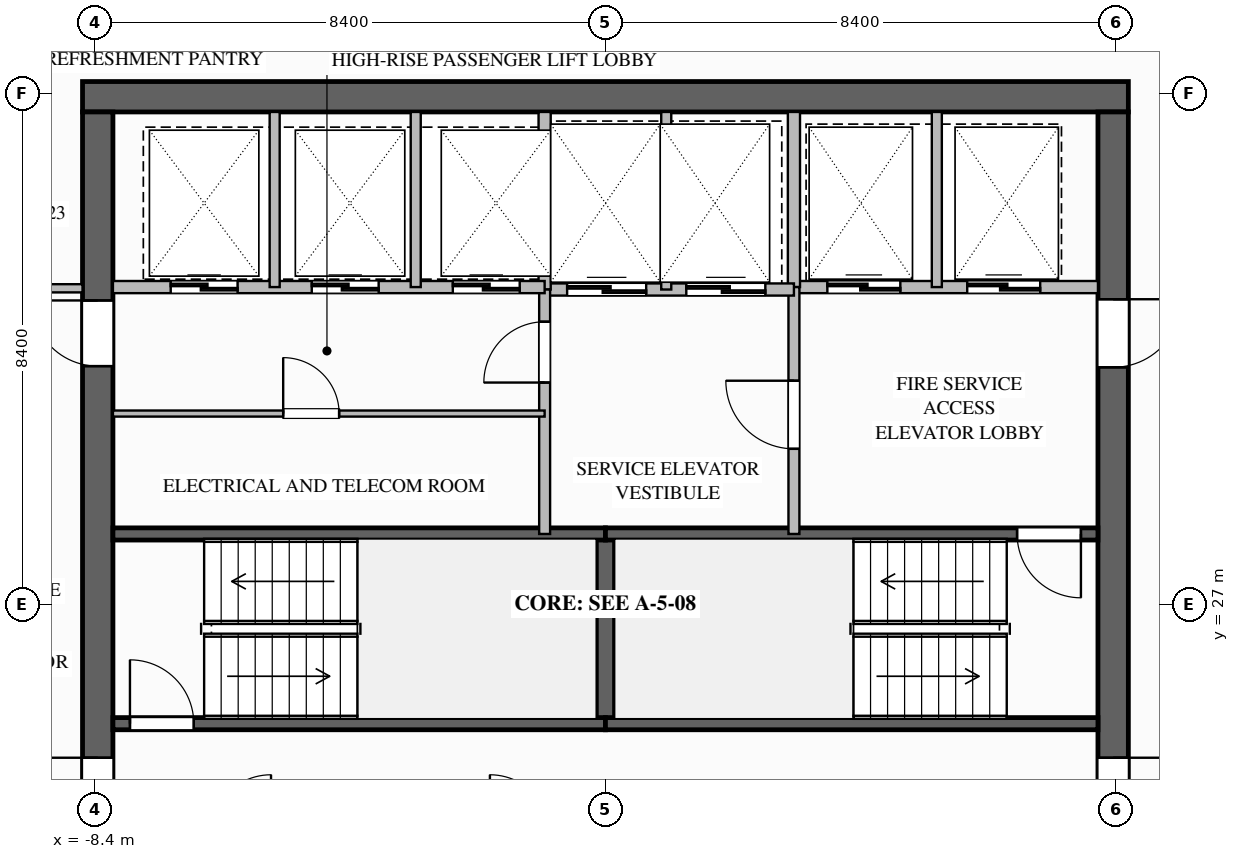
"""IFC4 building model, lengths in metres.
Left out: names, types, materials, properties, quantities, classifications, styles, units other than length and angle.
Written with IfcOpenShell. Run it as: python <this file> out.ifc"""

import sys

from ifc_helpers import new_model, si_unit, direction, frame, frame_2d, origin, place, context, subcontext, project, spatial, rectangle, extrude, element, fill, save


model = new_model("IFC4")
c1 = context("Model", 3, precision=1e-05, world=origin(), true_north=direction((0.0, 1.0)))
c2 = subcontext(c1, "Body", "Model", "MODEL_VIEW")
j1 = project(units=[si_unit("LENGTHUNIT", "METRE"), si_unit("PLANEANGLEUNIT", "RADIAN")], contexts=[c1])
p1 = place(None, origin())
s1 = spatial("IfcSite", under=j1, at=p1, CompositionType="ELEMENT")
p2 = place(p1, origin())
s2 = spatial("IfcBuilding", under=s1, at=p2, CompositionType="ELEMENT")
p3 = place(p2, frame((0.0, 0.0, 178.8)))
s3 = spatial("IfcBuildingStorey", under=s2, at=p3, CompositionType="ELEMENT", Elevation=178.8)
p4 = place(p3, frame((-8.6, 35.35, 0.0), z_axis=(0.0, 0.0, 1.0), x_axis=(1.0, 0.0, 0.0)))
e1 = element("IfcWall", 1, at=p4, inside=s3, PredefinedType="SHEAR", context=c2, shape_type="SweptSolid", body=[
    extrude(rectangle(XDim=17.2, YDim=0.5, at=frame_2d((8.6, 0.0))), origin(), (0.0, 0.0, 1.0), 3.55),
])
p5 = place(p3, frame((8.35, 35.1, 0.0), z_axis=(0.0, 0.0, 1.0), x_axis=(0.0, -1.0, 0.0)))
e2 = element("IfcWall", 2, at=p5, inside=s3, PredefinedType="SHEAR", context=c2, shape_type="SweptSolid", body=[
    extrude(rectangle(XDim=16.2, YDim=0.5, at=frame_2d((8.1, 0.0))), origin(), (0.0, 0.0, 1.0), 3.55),
])
p6 = place(p5, frame((3.08, 0.0, 0.0)))
e3 = element("IfcOpeningElement", 3, at=p6, cuts=e2, PredefinedType="OPENING", context=c2, shape_type="SweptSolid", body=[
    extrude(rectangle(XDim=1.12, YDim=2.1, at=frame_2d((0.56, 1.05))), frame((0.0, 0.26, 0.0), z_axis=(0.0, -1.0, 0.0), x_axis=(1.0, 0.0, 0.0)), (0.0, 0.0, 1.0), 0.52),
])
p7 = place(p5, frame((10.62, 0.0, 0.0)))
e4 = element("IfcOpeningElement", 4, at=p7, cuts=e2, PredefinedType="OPENING", context=c2, shape_type="SweptSolid", body=[
    extrude(rectangle(XDim=1.08, YDim=2.04, at=frame_2d((0.54, 1.02))), frame((0.0, 0.26, 0.0), z_axis=(0.0, -1.0, 0.0), x_axis=(1.0, 0.0, 0.0)), (0.0, 0.0, 1.0), 0.52),
])
p8 = place(p3, frame((-8.35, 18.9, 0.0), z_axis=(0.0, 0.0, 1.0), x_axis=(0.0, 1.0, 0.0)))
e5 = element("IfcWall", 5, at=p8, inside=s3, PredefinedType="SHEAR", context=c2, shape_type="SweptSolid", body=[
    extrude(rectangle(XDim=16.2, YDim=0.5, at=frame_2d((8.1, 0.0))), origin(), (0.0, 0.0, 1.0), 3.55),
])
p9 = place(p8, frame((12.02, 0.0, 0.0)))
e6 = element("IfcOpeningElement", 6, at=p9, cuts=e5, PredefinedType="OPENING", context=c2, shape_type="SweptSolid", body=[
    extrude(rectangle(XDim=1.08, YDim=2.04, at=frame_2d((0.54, 1.02))), frame((0.0, 0.26, 0.0), z_axis=(0.0, -1.0, 0.0), x_axis=(1.0, 0.0, 0.0)), (0.0, 0.0, 1.0), 0.52),
])
p10 = place(p8, frame((4.5, 0.0, 0.0)))
e7 = element("IfcOpeningElement", 7, at=p10, cuts=e5, PredefinedType="OPENING", context=c2, shape_type="SweptSolid", body=[
    extrude(rectangle(XDim=1.08, YDim=2.04, at=frame_2d((0.54, 1.02))), frame((0.0, 0.26, 0.0), z_axis=(0.0, -1.0, 0.0), x_axis=(1.0, 0.0, 0.0)), (0.0, 0.0, 1.0), 0.52),
])
p11 = place(p3, frame((0.0, 25.04, 0.0), z_axis=(0.0, 0.0, 1.0), x_axis=(0.0, 1.0, 0.0)))
e8 = element("IfcWall", 8, at=p11, inside=s3, PredefinedType="SOLIDWALL", context=c2, shape_type="SweptSolid", body=[
    extrude(rectangle(XDim=3.12, YDim=0.3, at=frame_2d((1.56, 0.0))), origin(), (0.0, 0.0, 1.0), 3.29),
])
p12 = place(p3, frame((-8.1, 25.04, 0.0), z_axis=(0.0, 0.0, 1.0), x_axis=(1.0, 0.0, 0.0)))
e9 = element("IfcWall", 9, at=p12, inside=s3, PredefinedType="SOLIDWALL", context=c2, shape_type="SweptSolid", body=[
    extrude(rectangle(XDim=8.1, YDim=0.2, at=frame_2d((4.05, 0.0))), origin(), (0.0, 0.0, 1.0), 3.29),
])
p13 = place(p12, frame((0.28, 0.0, 0.0)))
e10 = element("IfcOpeningElement", 10, at=p13, cuts=e9, PredefinedType="OPENING", context=c2, shape_type="SweptSolid", body=[
    extrude(rectangle(XDim=1.05, YDim=2.1, at=frame_2d((0.525, 1.05))), frame((0.0, 0.11, 0.0), z_axis=(0.0, -1.0, 0.0), x_axis=(1.0, 0.0, 0.0)), (0.0, 0.0, 1.0), 0.22),
])
for number, where, z_axis, x_axis in (
    (11, (-8.1, 28.16, 0.0), (0.0, 0.0, 1.0), (1.0, 0.0, 0.0)),
    (12, (0.0, 25.04, 0.0), (0.0, 0.0, 1.0), (1.0, 0.0, 0.0)),
):
    element("IfcWall", number, at=place(p3, frame(where, z_axis=z_axis, x_axis=x_axis)), inside=s3, PredefinedType="SOLIDWALL", context=c2, shape_type="SweptSolid", body=[
        extrude(rectangle(XDim=8.1, YDim=0.2, at=frame_2d((4.05, 0.0))), origin(), (0.0, 0.0, 1.0), 3.29),
    ])
p14 = place(p3, frame((8.1, 28.16, 0.0), z_axis=(0.0, 0.0, 1.0), x_axis=(-1.0, 0.0, 0.0)))
e13 = element("IfcWall", 13, at=p14, inside=s3, PredefinedType="SOLIDWALL", context=c2, shape_type="SweptSolid", body=[
    extrude(rectangle(XDim=8.1, YDim=0.2, at=frame_2d((4.05, 0.0))), origin(), (0.0, 0.0, 1.0), 3.29),
])
p15 = place(p14, frame((0.28, 0.0, 0.0)))
e14 = element("IfcOpeningElement", 14, at=p15, cuts=e13, PredefinedType="OPENING", context=c2, shape_type="SweptSolid", body=[
    extrude(rectangle(XDim=1.05, YDim=2.1, at=frame_2d((0.525, 1.05))), frame((0.0, 0.11, 0.0), z_axis=(0.0, -1.0, 0.0), x_axis=(1.0, 0.0, 0.0)), (0.0, 0.0, 1.0), 0.22),
])
p16 = place(p3, frame((3.1, 32.22, 0.0), z_axis=(0.0, 0.0, 1.0), x_axis=(1.0, 0.0, 0.0)))
e15 = element("IfcWall", 15, at=p16, inside=s3, PredefinedType="SOLIDWALL", context=c2, shape_type="SweptSolid", body=[
    extrude(rectangle(XDim=5.0, YDim=0.2, at=frame_2d((2.5, 0.0))), origin(), (0.0, 0.0, 1.0), 3.29),
])
p17 = place(p16, frame((0.55, 0.0, 0.0)))
e16 = element("IfcOpeningElement", 16, at=p17, cuts=e15, PredefinedType="OPENING", context=c2, shape_type="SweptSolid", body=[
    extrude(rectangle(XDim=1.2, YDim=2.2, at=frame_2d((0.6, 1.1))), frame((0.0, 0.11, 0.0), z_axis=(0.0, -1.0, 0.0), x_axis=(1.0, 0.0, 0.0)), (0.0, 0.0, 1.0), 0.22),
])
p18 = place(p16, frame((2.85, 0.0, 0.0)))
e17 = element("IfcOpeningElement", 17, at=p18, cuts=e15, PredefinedType="OPENING", context=c2, shape_type="SweptSolid", body=[
    extrude(rectangle(XDim=1.2, YDim=2.2, at=frame_2d((0.6, 1.1))), frame((0.0, 0.11, 0.0), z_axis=(0.0, -1.0, 0.0), x_axis=(1.0, 0.0, 0.0)), (0.0, 0.0, 1.0), 0.22),
])
p19 = place(p3, frame((3.1, 32.22, 0.0), z_axis=(0.0, 0.0, 1.0), x_axis=(0.0, 1.0, 0.0)))
e18 = element("IfcWall", 18, at=p19, inside=s3, PredefinedType="SOLIDWALL", context=c2, shape_type="SweptSolid", body=[
    extrude(rectangle(XDim=2.88, YDim=0.2, at=frame_2d((1.44, 0.0))), origin(), (0.0, 0.0, 1.0), 3.29),
])
p20 = place(p3, frame((5.45, 32.22, 0.0), z_axis=(0.0, 0.0, 1.0), x_axis=(0.0, 1.0, 0.0)))
e19 = element("IfcWall", 19, at=p20, inside=s3, PredefinedType="PARTITIONING", context=c2, shape_type="SweptSolid", body=[
    extrude(rectangle(XDim=2.88, YDim=0.165, at=frame_2d((1.44, 0.0))), origin(), (0.0, 0.0, 1.0), 3.29),
])
p21 = place(p3, frame((3.1, 28.16, 0.0), z_axis=(0.0, 0.0, 1.0), x_axis=(0.0, 1.0, 0.0)))
e20 = element("IfcWall", 20, at=p21, inside=s3, PredefinedType="SOLIDWALL", context=c2, shape_type="SweptSolid", body=[
    extrude(rectangle(XDim=4.06, YDim=0.18, at=frame_2d((2.03, 0.0))), origin(), (0.0, 0.0, 1.0), 3.29),
])
p22 = place(p21, frame((1.4, 0.0, 0.0)))
e21 = element("IfcOpeningElement", 21, at=p22, cuts=e20, PredefinedType="OPENING", context=c2, shape_type="SweptSolid", body=[
    extrude(rectangle(XDim=1.12, YDim=2.1, at=frame_2d((0.56, 1.05))), frame((0.0, 0.1, 0.0), z_axis=(0.0, -1.0, 0.0), x_axis=(1.0, 0.0, 0.0)), (0.0, 0.0, 1.0), 0.2),
])
p23 = place(p3, frame((-1.0, 32.18, 0.0), z_axis=(0.0, 0.0, 1.0), x_axis=(1.0, 0.0, 0.0)))
e22 = element("IfcWall", 22, at=p23, inside=s3, PredefinedType="SOLIDWALL", context=c2, shape_type="SweptSolid", body=[
    extrude(rectangle(XDim=4.1, YDim=0.2, at=frame_2d((2.05, 0.0))), origin(), (0.0, 0.0, 1.0), 3.29),
])
p24 = place(p23, frame((0.37, 0.0, 0.0)))
e23 = element("IfcOpeningElement", 23, at=p24, cuts=e22, PredefinedType="OPENING", context=c2, shape_type="SweptSolid", body=[
    extrude(rectangle(XDim=1.3, YDim=2.2, at=frame_2d((0.65, 1.1))), frame((0.0, 0.11, 0.0), z_axis=(0.0, -1.0, 0.0), x_axis=(1.0, 0.0, 0.0)), (0.0, 0.0, 1.0), 0.22),
])
p25 = place(p23, frame((2.33, 0.0, 0.0)))
e24 = element("IfcOpeningElement", 24, at=p25, cuts=e22, PredefinedType="OPENING", context=c2, shape_type="SweptSolid", body=[
    extrude(rectangle(XDim=1.3, YDim=2.2, at=frame_2d((0.65, 1.1))), frame((0.0, 0.11, 0.0), z_axis=(0.0, -1.0, 0.0), x_axis=(1.0, 0.0, 0.0)), (0.0, 0.0, 1.0), 0.22),
])
p26 = place(p3, frame((-1.0, 32.18, 0.0), z_axis=(0.0, 0.0, 1.0), x_axis=(0.0, 1.0, 0.0)))
e25 = element("IfcWall", 25, at=p26, inside=s3, PredefinedType="SOLIDWALL", context=c2, shape_type="SweptSolid", body=[
    extrude(rectangle(XDim=2.92, YDim=0.2, at=frame_2d((1.46, 0.0))), origin(), (0.0, 0.0, 1.0), 3.29),
])
p27 = place(p3, frame((1.0, 32.18, 0.0), z_axis=(0.0, 0.0, 1.0), x_axis=(0.0, 1.0, 0.0)))
e26 = element("IfcWall", 26, at=p27, inside=s3, PredefinedType="PARTITIONING", context=c2, shape_type="SweptSolid", body=[
    extrude(rectangle(XDim=2.92, YDim=0.165, at=frame_2d((1.46, 0.0))), origin(), (0.0, 0.0, 1.0), 3.29),
])
p28 = place(p3, frame((-1.0, 28.16, 0.0), z_axis=(0.0, 0.0, 1.0), x_axis=(0.0, 1.0, 0.0)))
e27 = element("IfcWall", 27, at=p28, inside=s3, PredefinedType="SOLIDWALL", context=c2, shape_type="SweptSolid", body=[
    extrude(rectangle(XDim=4.02, YDim=0.18, at=frame_2d((2.01, 0.0))), origin(), (0.0, 0.0, 1.0), 3.29),
])
p29 = place(p28, frame((2.49, 0.0, 0.0)))
e28 = element("IfcOpeningElement", 28, at=p29, cuts=e27, PredefinedType="OPENING", context=c2, shape_type="SweptSolid", body=[
    extrude(rectangle(XDim=1.0, YDim=2.1, at=frame_2d((0.5, 1.05))), frame((0.0, 0.1, 0.0), z_axis=(0.0, -1.0, 0.0), x_axis=(1.0, 0.0, 0.0)), (0.0, 0.0, 1.0), 0.2),
])
p30 = place(p3, frame((-8.1, 32.22, 0.0), z_axis=(0.0, 0.0, 1.0), x_axis=(1.0, 0.0, 0.0)))
e29 = element("IfcWall", 29, at=p30, inside=s3, PredefinedType="SOLIDWALL", context=c2, shape_type="SweptSolid", body=[
    extrude(rectangle(XDim=7.1, YDim=0.2, at=frame_2d((3.55, 0.0))), origin(), (0.0, 0.0, 1.0), 3.29),
])
p31 = place(p30, frame((0.95, 0.0, 0.0)))
e30 = element("IfcOpeningElement", 30, at=p31, cuts=e29, PredefinedType="OPENING", context=c2, shape_type="SweptSolid", body=[
    extrude(rectangle(XDim=1.1, YDim=2.2, at=frame_2d((0.55, 1.1))), frame((0.0, 0.11, 0.0), z_axis=(0.0, -1.0, 0.0), x_axis=(1.0, 0.0, 0.0)), (0.0, 0.0, 1.0), 0.22),
])
p32 = place(p30, frame((3.27, 0.0, 0.0)))
e31 = element("IfcOpeningElement", 31, at=p32, cuts=e29, PredefinedType="OPENING", context=c2, shape_type="SweptSolid", body=[
    extrude(rectangle(XDim=1.1, YDim=2.2, at=frame_2d((0.55, 1.1))), frame((0.0, 0.11, 0.0), z_axis=(0.0, -1.0, 0.0), x_axis=(1.0, 0.0, 0.0)), (0.0, 0.0, 1.0), 0.22),
])
p33 = place(p30, frame((5.59, 0.0, 0.0)))
e32 = element("IfcOpeningElement", 32, at=p33, cuts=e29, PredefinedType="OPENING", context=c2, shape_type="SweptSolid", body=[
    extrude(rectangle(XDim=1.1, YDim=2.2, at=frame_2d((0.55, 1.1))), frame((0.0, 0.11, 0.0), z_axis=(0.0, -1.0, 0.0), x_axis=(1.0, 0.0, 0.0)), (0.0, 0.0, 1.0), 0.22),
])
for number, where, z_axis, x_axis in (
    (33, (-5.44, 32.22, 0.0), (0.0, 0.0, 1.0), (0.0, 1.0, 0.0)),
    (34, (-3.12, 32.22, 0.0), (0.0, 0.0, 1.0), (0.0, 1.0, 0.0)),
):
    element("IfcWall", number, at=place(p3, frame(where, z_axis=z_axis, x_axis=x_axis)), inside=s3, PredefinedType="PARTITIONING", context=c2, shape_type="SweptSolid", body=[
        extrude(rectangle(XDim=2.88, YDim=0.165, at=frame_2d((1.44, 0.0))), origin(), (0.0, 0.0, 1.0), 3.29),
    ])
p34 = place(p3, frame((-8.1, 30.14, 0.0), z_axis=(0.0, 0.0, 1.0), x_axis=(1.0, 0.0, 0.0)))
e35 = element("IfcWall", 35, at=p34, inside=s3, PredefinedType="PARTITIONING", context=c2, shape_type="SweptSolid", body=[
    extrude(rectangle(XDim=7.1, YDim=0.1, at=frame_2d((3.55, 0.0))), origin(), (0.0, 0.0, 1.0), 3.29),
])
p35 = place(p34, frame((2.8, 0.0, 0.0)))
e36 = element("IfcOpeningElement", 36, at=p35, cuts=e35, PredefinedType="OPENING", context=c2, shape_type="SweptSolid", body=[
    extrude(rectangle(XDim=0.92, YDim=2.1, at=frame_2d((0.46, 1.05))), frame((0.0, 0.06, 0.0), z_axis=(0.0, -1.0, 0.0), x_axis=(1.0, 0.0, 0.0)), (0.0, 0.0, 1.0), 0.12),
])
p36 = place(p3, frame((-10.7, 32.2, 0.0), z_axis=(0.0, 0.0, 1.0), x_axis=(1.0, 0.0, 0.0)))
e37 = element("IfcWall", 37, at=p36, inside=s3, PredefinedType="PARTITIONING", context=c2, shape_type="SweptSolid", body=[
    extrude(rectangle(XDim=2.1, YDim=0.135, at=frame_2d((1.05, 0.0))), origin(), (0.0, 0.0, 1.0), 3.29),
])
p37 = place(p36, frame((0.55, 0.0, 0.0)))
e38 = element("IfcOpeningElement", 38, at=p37, cuts=e37, PredefinedType="OPENING", context=c2, shape_type="SweptSolid", body=[
    extrude(rectangle(XDim=0.92, YDim=2.1, at=frame_2d((0.46, 1.05))), frame((0.0, 0.077, 0.0), z_axis=(0.0, -1.0, 0.0), x_axis=(1.0, 0.0, 0.0)), (0.0, 0.0, 1.0), 0.155),
])
p38 = place(p13, origin())
e39 = element("IfcDoor", 39, at=p38, inside=s3, OperationType="SINGLE_SWING_LEFT", PredefinedType="DOOR", context=c2, shape_type="SweptSolid", body=[
    extrude(rectangle(XDim=1.05, YDim=2.1, at=frame_2d((0.525, 1.05))), frame((0.0, 0.025, 0.0), z_axis=(0.0, -1.0, 0.0), x_axis=(1.0, 0.0, 0.0)), (0.0, 0.0, 1.0), 0.05),
])
fill(e10, e39)
p39 = place(p15, origin())
e40 = element("IfcDoor", 40, at=p39, inside=s3, OperationType="SINGLE_SWING_LEFT", PredefinedType="DOOR", context=c2, shape_type="SweptSolid", body=[
    extrude(rectangle(XDim=1.05, YDim=2.1, at=frame_2d((0.525, 1.05))), frame((0.0, 0.025, 0.0), z_axis=(0.0, -1.0, 0.0), x_axis=(1.0, 0.0, 0.0)), (0.0, 0.0, 1.0), 0.05),
])
fill(e14, e40)
p40 = place(p17, origin())
e41 = element("IfcDoor", 41, at=p40, inside=s3, OperationType="SLIDING_TO_LEFT", PredefinedType="DOOR", context=c2, shape_type="SweptSolid", body=[
    extrude(rectangle(XDim=1.2, YDim=2.2, at=frame_2d((0.6, 1.1))), frame((0.0, 0.025, 0.0), z_axis=(0.0, -1.0, 0.0), x_axis=(1.0, 0.0, 0.0)), (0.0, 0.0, 1.0), 0.05),
])
fill(e16, e41)
p41 = place(p18, origin())
e42 = element("IfcDoor", 42, at=p41, inside=s3, OperationType="SLIDING_TO_LEFT", PredefinedType="DOOR", context=c2, shape_type="SweptSolid", body=[
    extrude(rectangle(XDim=1.2, YDim=2.2, at=frame_2d((0.6, 1.1))), frame((0.0, 0.025, 0.0), z_axis=(0.0, -1.0, 0.0), x_axis=(1.0, 0.0, 0.0)), (0.0, 0.0, 1.0), 0.05),
])
fill(e17, e42)
p42 = place(p22, origin())
e43 = element("IfcDoor", 43, at=p42, inside=s3, OperationType="SINGLE_SWING_RIGHT", PredefinedType="DOOR", context=c2, shape_type="SweptSolid", body=[
    extrude(rectangle(XDim=1.12, YDim=2.1, at=frame_2d((0.56, 1.05))), frame((0.0, 0.025, 0.0), z_axis=(0.0, -1.0, 0.0), x_axis=(1.0, 0.0, 0.0)), (0.0, 0.0, 1.0), 0.05),
])
fill(e21, e43)
p43 = place(p6, origin())
e44 = element("IfcDoor", 44, at=p43, inside=s3, OperationType="SINGLE_SWING_LEFT", PredefinedType="DOOR", context=c2, shape_type="SweptSolid", body=[
    extrude(rectangle(XDim=1.12, YDim=2.1, at=frame_2d((0.56, 1.05))), frame((0.0, 0.025, 0.0), z_axis=(0.0, -1.0, 0.0), x_axis=(1.0, 0.0, 0.0)), (0.0, 0.0, 1.0), 0.05),
])
fill(e3, e44)
p44 = place(p24, origin())
e45 = element("IfcDoor", 45, at=p44, inside=s3, OperationType="SLIDING_TO_LEFT", PredefinedType="DOOR", context=c2, shape_type="SweptSolid", body=[
    extrude(rectangle(XDim=1.3, YDim=2.2, at=frame_2d((0.65, 1.1))), frame((0.0, 0.025, 0.0), z_axis=(0.0, -1.0, 0.0), x_axis=(1.0, 0.0, 0.0)), (0.0, 0.0, 1.0), 0.05),
])
fill(e23, e45)
p45 = place(p25, origin())
e46 = element("IfcDoor", 46, at=p45, inside=s3, OperationType="SLIDING_TO_LEFT", PredefinedType="DOOR", context=c2, shape_type="SweptSolid", body=[
    extrude(rectangle(XDim=1.3, YDim=2.2, at=frame_2d((0.65, 1.1))), frame((0.0, 0.025, 0.0), z_axis=(0.0, -1.0, 0.0), x_axis=(1.0, 0.0, 0.0)), (0.0, 0.0, 1.0), 0.05),
])
fill(e24, e46)
p46 = place(p29, origin())
e47 = element("IfcDoor", 47, at=p46, inside=s3, OperationType="SINGLE_SWING_LEFT", PredefinedType="DOOR", context=c2, shape_type="SweptSolid", body=[
    extrude(rectangle(XDim=1.0, YDim=2.1, at=frame_2d((0.5, 1.05))), frame((0.0, 0.025, 0.0), z_axis=(0.0, -1.0, 0.0), x_axis=(1.0, 0.0, 0.0)), (0.0, 0.0, 1.0), 0.05),
])
fill(e28, e47)
p47 = place(p31, origin())
e48 = element("IfcDoor", 48, at=p47, inside=s3, OperationType="SLIDING_TO_LEFT", PredefinedType="DOOR", context=c2, shape_type="SweptSolid", body=[
    extrude(rectangle(XDim=1.1, YDim=2.2, at=frame_2d((0.55, 1.1))), frame((0.0, 0.025, 0.0), z_axis=(0.0, -1.0, 0.0), x_axis=(1.0, 0.0, 0.0)), (0.0, 0.0, 1.0), 0.05),
])
fill(e30, e48)
p48 = place(p32, origin())
e49 = element("IfcDoor", 49, at=p48, inside=s3, OperationType="SLIDING_TO_LEFT", PredefinedType="DOOR", context=c2, shape_type="SweptSolid", body=[
    extrude(rectangle(XDim=1.1, YDim=2.2, at=frame_2d((0.55, 1.1))), frame((0.0, 0.025, 0.0), z_axis=(0.0, -1.0, 0.0), x_axis=(1.0, 0.0, 0.0)), (0.0, 0.0, 1.0), 0.05),
])
fill(e31, e49)
p49 = place(p33, origin())
e50 = element("IfcDoor", 50, at=p49, inside=s3, OperationType="SLIDING_TO_LEFT", PredefinedType="DOOR", context=c2, shape_type="SweptSolid", body=[
    extrude(rectangle(XDim=1.1, YDim=2.2, at=frame_2d((0.55, 1.1))), frame((0.0, 0.025, 0.0), z_axis=(0.0, -1.0, 0.0), x_axis=(1.0, 0.0, 0.0)), (0.0, 0.0, 1.0), 0.05),
])
fill(e32, e50)
p50 = place(p9, origin())
e51 = element("IfcDoor", 51, at=p50, inside=s3, OperationType="SINGLE_SWING_RIGHT", PredefinedType="DOOR", context=c2, shape_type="SweptSolid", body=[
    extrude(rectangle(XDim=1.08, YDim=2.04, at=frame_2d((0.54, 1.02))), frame((0.0, 0.025, 0.0), z_axis=(0.0, -1.0, 0.0), x_axis=(1.0, 0.0, 0.0)), (0.0, 0.0, 1.0), 0.05),
])
fill(e6, e51)
p51 = place(p35, origin())
e52 = element("IfcDoor", 52, at=p51, inside=s3, OperationType="SINGLE_SWING_LEFT", PredefinedType="DOOR", context=c2, shape_type="SweptSolid", body=[
    extrude(rectangle(XDim=0.92, YDim=2.1, at=frame_2d((0.46, 1.05))), frame((0.0, 0.025, 0.0), z_axis=(0.0, -1.0, 0.0), x_axis=(1.0, 0.0, 0.0)), (0.0, 0.0, 1.0), 0.05),
])
fill(e36, e52)
p52 = place(p10, origin())
e53 = element("IfcDoor", 53, at=p52, inside=s3, OperationType="SINGLE_SWING_RIGHT", PredefinedType="DOOR", context=c2, shape_type="SweptSolid", body=[
    extrude(rectangle(XDim=1.08, YDim=2.04, at=frame_2d((0.54, 1.02))), frame((0.0, 0.025, 0.0), z_axis=(0.0, -1.0, 0.0), x_axis=(1.0, 0.0, 0.0)), (0.0, 0.0, 1.0), 0.05),
])
fill(e7, e53)
p53 = place(p7, origin())
e54 = element("IfcDoor", 54, at=p53, inside=s3, OperationType="SINGLE_SWING_LEFT", PredefinedType="DOOR", context=c2, shape_type="SweptSolid", body=[
    extrude(rectangle(XDim=1.08, YDim=2.04, at=frame_2d((0.54, 1.02))), frame((0.0, 0.025, 0.0), z_axis=(0.0, -1.0, 0.0), x_axis=(1.0, 0.0, 0.0)), (0.0, 0.0, 1.0), 0.05),
])
fill(e4, e54)
save(model, sys.argv[1])
